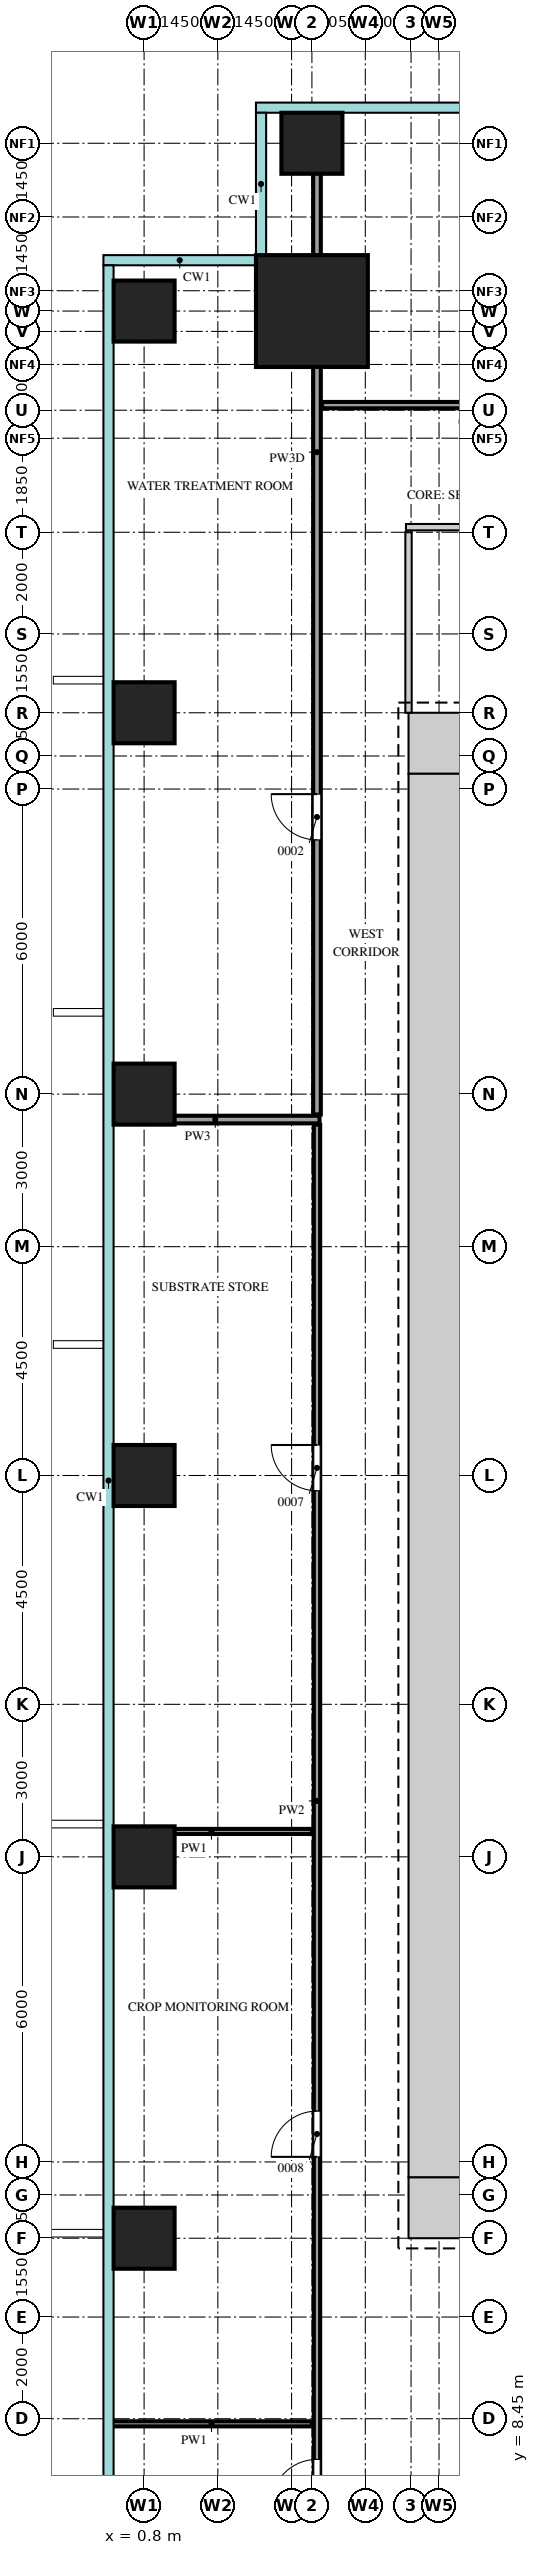
"""IFC4 building model, lengths in metres.
Left out: names, types, materials, properties, quantities, classifications, styles, units other than length and angle.
Written with IfcOpenShell. Run it as: python <this file> out.ifc"""

import sys

from ifc_helpers import new_model, si_unit, direction, frame, frame_2d, origin, origin_2d, place, context, subcontext, project, spatial, rectangle, extrude, source, transform, mapped, element, fill, save


model = new_model("IFC4")
c1 = context("Model", 3, precision=1e-05, world=origin(), true_north=direction((0.0, 1.0)))
c2 = subcontext(c1, "Body", "Model", "MODEL_VIEW")
j1 = project(units=[si_unit("LENGTHUNIT", "METRE"), si_unit("PLANEANGLEUNIT", "RADIAN")], contexts=[c1])
p1 = place(None, origin())
s1 = spatial("IfcSite", under=j1, at=p1, CompositionType="ELEMENT")
p2 = place(p1, origin())
s2 = spatial("IfcBuilding", under=s1, at=p2, CompositionType="ELEMENT")
p3 = place(p2, frame((0.0, 0.0, 37.5)))
s3 = spatial("IfcBuildingStorey", under=s2, at=p3, CompositionType="ELEMENT", Elevation=37.5)
m1 = source(origin(), c2, "Body", "SweptSolid", [
    extrude(rectangle(XDim=1.2, YDim=1.2, at=frame_2d((0.6, 0.0))), origin(), (0.0, 0.0, 1.0), 4.2),
])
for number, where, z_axis, x_axis in (
    (1, (6.0, 41.4, 0.0), (0.0, 0.0, 1.0), (1.0, 0.0, 0.0)),
    (2, (6.0, 12.6, 0.0), (0.0, 0.0, 1.0), (1.0, 0.0, 0.0)),
):
    element("IfcWall", number, at=place(p3, frame(where, z_axis=z_axis, x_axis=x_axis)), inside=s3, PredefinedType="SHEAR", context=c2, shape_type="MappedRepresentation", body=[
        mapped(m1, transform((0.0, 0.0, 0.0))),
    ])
m2 = source(origin(), c2, "Body", "SweptSolid", [
    extrude(rectangle(XDim=27.6, YDim=1.2, at=frame_2d((13.8, 0.0))), origin(), (0.0, 0.0, 1.0), 4.2),
])
p4 = place(p3, frame((6.6, 13.2, 0.0), z_axis=(0.0, 0.0, 1.0), x_axis=(0.0, 1.0, 0.0)))
e3 = element("IfcWall", 3, at=p4, inside=s3, PredefinedType="SHEAR", context=c2, shape_type="MappedRepresentation", body=[
    mapped(m2, transform((0.0, 0.0, 0.0))),
])
m3 = source(origin(), c2, "Body", "SweptSolid", [
    extrude(rectangle(XDim=2.2, YDim=2.2, at=origin_2d()), origin(), (0.0, 0.0, 1.0), 4.5),
])
p5 = place(p3, frame((4.1, 49.9, 0.0), z_axis=(0.0, 0.0, 1.0), x_axis=(1.0, 0.0, 0.0)))
e4 = element("IfcColumn", 4, at=p5, inside=s3, PredefinedType="COLUMN", context=c2, shape_type="MappedRepresentation", body=[
    mapped(m3, transform((0.0, 0.0, 0.0))),
])
m4 = source(origin(), c2, "Body", "SweptSolid", [
    extrude(rectangle(XDim=1.2, YDim=1.2, at=origin_2d()), origin(), (0.0, 0.0, 1.0), 4.2),
])
for number, where, z_axis, x_axis in (
    (5, (4.1, 53.2, 0.0), (0.0, 0.0, 1.0), (1.0, 0.0, 0.0)),
    (6, (0.8, 12.0, 0.0), (0.0, 0.0, 1.0), (1.0, 0.0, 0.0)),
    (7, (0.8, 19.5, 0.0), (0.0, 0.0, 1.0), (1.0, 0.0, 0.0)),
    (8, (0.8, 27.0, 0.0), (0.0, 0.0, 1.0), (1.0, 0.0, 0.0)),
    (9, (0.8, 34.5, 0.0), (0.0, 0.0, 1.0), (1.0, 0.0, 0.0)),
    (10, (0.8, 42.0, 0.0), (0.0, 0.0, 1.0), (1.0, 0.0, 0.0)),
    (11, (0.8, 49.9, 0.0), (0.0, 0.0, 1.0), (1.0, 0.0, 0.0)),
):
    element("IfcColumn", number, at=place(p3, frame(where, z_axis=z_axis, x_axis=x_axis)), inside=s3, PredefinedType="COLUMN", context=c2, shape_type="MappedRepresentation", body=[
        mapped(m4, transform((0.0, 0.0, 0.0))),
    ])
m5 = source(origin(), c2, "Body", "SweptSolid", [
    extrude(rectangle(XDim=27.75, YDim=0.125, at=frame_2d((13.875, 0.0))), origin(), (0.0, 0.0, 1.0), 4.3),
])
p6 = place(p3, frame((4.2, 6.15, 0.0), z_axis=(0.0, 0.0, 1.0), x_axis=(0.0, 1.0, 0.0)))
e12 = element("IfcWall", 12, at=p6, inside=s3, PredefinedType="PARTITIONING", context=c2, shape_type="MappedRepresentation", body=[
    mapped(m5, transform((0.0, 0.0, 0.0))),
])
m6 = source(origin(), c2, "Body", "SweptSolid", [
    extrude(rectangle(XDim=0.9, YDim=2.1, at=frame_2d((0.45, 1.05))), frame((0.0, 0.073, 0.0), z_axis=(0.0, -1.0, 0.0), x_axis=(1.0, 0.0, 0.0)), (0.0, 0.0, 1.0), 0.145),
])
p7 = place(p6, frame((0.6, 0.0, 0.0)))
e13 = element("IfcOpeningElement", 13, at=p7, cuts=e12, PredefinedType="OPENING", context=c2, shape_type="MappedRepresentation", body=[
    mapped(m6, transform((0.0, 0.0, 0.0))),
])
p8 = place(p6, frame((7.45, 0.0, 0.0)))
e14 = element("IfcOpeningElement", 14, at=p8, cuts=e12, PredefinedType="OPENING", context=c2, shape_type="MappedRepresentation", body=[
    mapped(m6, transform((0.0, 0.0, 0.0))),
])
p9 = place(p6, frame((20.55, 0.0, 0.0)))
e15 = element("IfcOpeningElement", 15, at=p9, cuts=e12, PredefinedType="OPENING", context=c2, shape_type="MappedRepresentation", body=[
    mapped(m6, transform((0.0, 0.0, 0.0))),
])
m7 = source(origin(), c2, "Body", "SweptSolid", [
    extrude(rectangle(XDim=3.95, YDim=0.1, at=frame_2d((1.975, 0.0))), origin(), (0.0, 0.0, 1.0), 4.3),
])
for number, where, z_axis, x_axis in (
    (16, (0.15, 8.35, 0.0), (0.0, 0.0, 1.0), (1.0, 0.0, 0.0)),
    (17, (0.15, 20.0, 0.0), (0.0, 0.0, 1.0), (1.0, 0.0, 0.0)),
):
    element("IfcWall", number, at=place(p3, frame(where, z_axis=z_axis, x_axis=x_axis)), inside=s3, PredefinedType="PARTITIONING", context=c2, shape_type="MappedRepresentation", body=[
        mapped(m7, transform((0.0, 0.0, 0.0))),
    ])
m8 = source(origin(), c2, "Body", "SweptSolid", [
    extrude(rectangle(XDim=4.1, YDim=0.15, at=frame_2d((2.05, 0.0))), origin(), (0.0, 0.0, 1.0), 4.3),
])
p10 = place(p3, frame((0.15, 34.0, 0.0), z_axis=(0.0, 0.0, 1.0), x_axis=(1.0, 0.0, 0.0)))
e18 = element("IfcWall", 18, at=p10, inside=s3, PredefinedType="PARTITIONING", context=c2, shape_type="MappedRepresentation", body=[
    mapped(m8, transform((0.0, 0.0, 0.0))),
])
m9 = source(origin(), c2, "Body", "SweptSolid", [
    extrude(rectangle(XDim=19.75, YDim=0.15, at=frame_2d((9.875, 0.0))), origin(), (0.0, 0.0, 1.0), 3.6),
])
p11 = place(p3, frame((4.2, 34.1, 0.0), z_axis=(0.0, 0.0, 1.0), x_axis=(0.0, 1.0, 0.0)))
e19 = element("IfcWall", 19, at=p11, inside=s3, PredefinedType="PARTITIONING", context=c2, shape_type="MappedRepresentation", body=[
    mapped(m9, transform((0.0, 0.0, 0.0))),
])
m10 = source(origin(), c2, "Body", "SweptSolid", [
    extrude(rectangle(XDim=0.9, YDim=2.1, at=frame_2d((0.45, 1.05))), frame((0.0, 0.085, 0.0), z_axis=(0.0, -1.0, 0.0), x_axis=(1.0, 0.0, 0.0)), (0.0, 0.0, 1.0), 0.17),
])
p12 = place(p11, frame((5.4, 0.0, 0.0)))
e20 = element("IfcOpeningElement", 20, at=p12, cuts=e19, PredefinedType="OPENING", context=c2, shape_type="MappedRepresentation", body=[
    mapped(m10, transform((0.0, 0.0, 0.0))),
])
m11 = source(origin(), c2, "Body", "SweptSolid", [
    extrude(rectangle(XDim=3.55, YDim=0.125, at=frame_2d((1.775, 0.0))), origin(), (0.0, 0.0, 1.0), 4.3),
])
p13 = place(p3, frame((6.0, 42.0, 0.0), z_axis=(0.0, 0.0, 1.0), x_axis=(0.0, 1.0, 0.0)))
e21 = element("IfcWall", 21, at=p13, inside=s3, PredefinedType="PARTITIONING", context=c2, shape_type="MappedRepresentation", body=[
    mapped(m11, transform((0.0, 0.0, 0.0))),
])
m12 = source(origin(), c2, "Body", "SweptSolid", [
    extrude(rectangle(XDim=7.95, YDim=0.125, at=frame_2d((3.975, 0.0))), origin(), (0.0, 0.0, 1.0), 4.3),
])
p14 = place(p3, frame((5.95, 45.65, 0.0), z_axis=(0.0, 0.0, 1.0), x_axis=(1.0, 0.0, 0.0)))
e22 = element("IfcWall", 22, at=p14, inside=s3, PredefinedType="PARTITIONING", context=c2, shape_type="MappedRepresentation", body=[
    mapped(m12, transform((0.0, 0.0, 0.0))),
])
p15 = place(p14, frame((3.55, 0.0, 0.0)))
e23 = element("IfcOpeningElement", 23, at=p15, cuts=e22, PredefinedType="OPENING", context=c2, shape_type="MappedRepresentation", body=[
    mapped(m6, transform((0.0, 0.0, 0.0))),
])
m13 = source(origin(), c2, "Body", "SweptSolid", [
    extrude(rectangle(XDim=26.45, YDim=0.125, at=frame_2d((13.225, 0.0))), origin(), (0.0, 0.0, 1.0), 4.3),
])
p16 = place(p3, frame((4.3, 48.05, 0.0), z_axis=(0.0, 0.0, 1.0), x_axis=(1.0, 0.0, 0.0)))
e24 = element("IfcWall", 24, at=p16, inside=s3, PredefinedType="PARTITIONING", context=c2, shape_type="MappedRepresentation", body=[
    mapped(m13, transform((0.0, 0.0, 0.0))),
])
p17 = place(p16, frame((3.35, 0.0, 0.0)))
e25 = element("IfcOpeningElement", 25, at=p17, cuts=e24, PredefinedType="OPENING", context=c2, shape_type="MappedRepresentation", body=[
    mapped(m6, transform((0.0, 0.0, 0.0))),
])
p18 = place(p16, frame((10.85, 0.0, 0.0)))
e26 = element("IfcOpeningElement", 26, at=p18, cuts=e24, PredefinedType="OPENING", context=c2, shape_type="MappedRepresentation", body=[
    mapped(m6, transform((0.0, 0.0, 0.0))),
])
p19 = place(p16, frame((20.35, 0.0, 0.0)))
e27 = element("IfcOpeningElement", 27, at=p19, cuts=e24, PredefinedType="OPENING", context=c2, shape_type="MappedRepresentation", body=[
    mapped(m6, transform((0.0, 0.0, 0.0))),
])
m14 = source(origin(), c2, "Body", "SweptSolid", [
    extrude(rectangle(XDim=0.9, YDim=2.1, at=frame_2d((0.45, 1.05))), frame((0.0, 0.025, 0.0), z_axis=(0.0, -1.0, 0.0), x_axis=(1.0, 0.0, 0.0)), (0.0, 0.0, 1.0), 0.05),
])
p20 = place(p7, origin())
e28 = element("IfcDoor", 28, at=p20, inside=s3, OperationType="SINGLE_SWING_RIGHT", PredefinedType="DOOR", context=c2, shape_type="MappedRepresentation", body=[
    mapped(m14, transform((0.0, 0.0, 0.0))),
])
fill(e13, e28)
p21 = place(p8, origin())
e29 = element("IfcDoor", 29, at=p21, inside=s3, OperationType="SINGLE_SWING_RIGHT", PredefinedType="DOOR", context=c2, shape_type="MappedRepresentation", body=[
    mapped(m14, transform((0.0, 0.0, 0.0))),
])
fill(e14, e29)
p22 = place(p9, origin())
e30 = element("IfcDoor", 30, at=p22, inside=s3, OperationType="SINGLE_SWING_LEFT", PredefinedType="DOOR", context=c2, shape_type="MappedRepresentation", body=[
    mapped(m14, transform((0.0, 0.0, 0.0))),
])
fill(e15, e30)
p23 = place(p12, origin())
e31 = element("IfcDoor", 31, at=p23, inside=s3, OperationType="SINGLE_SWING_LEFT", PredefinedType="DOOR", context=c2, shape_type="MappedRepresentation", body=[
    mapped(m14, transform((0.0, 0.0, 0.0))),
])
fill(e20, e31)
save(model, sys.argv[1])
